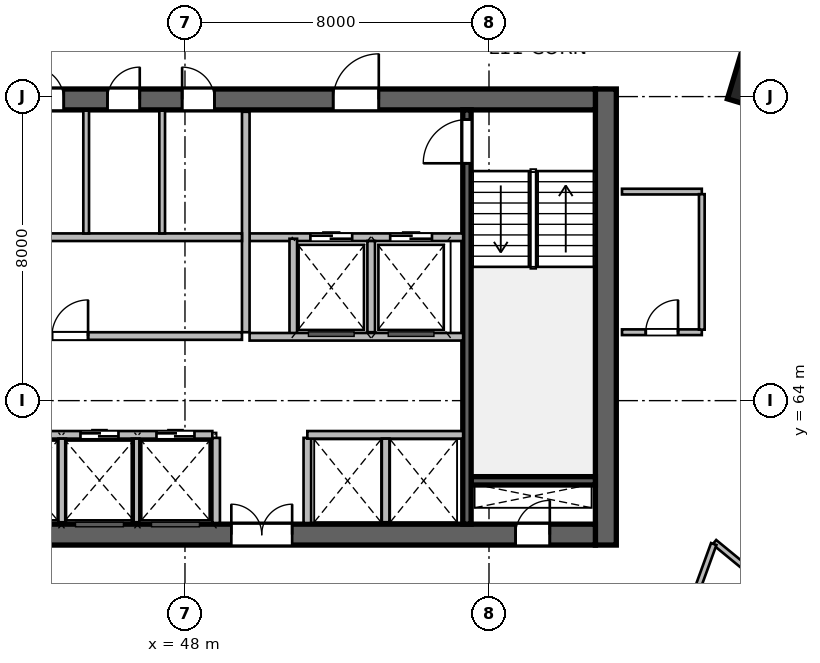
"""IFC4 building model, lengths in metres.
Left out: names, types, materials, properties, quantities, classifications, styles, units other than length and angle.
Written with IfcOpenShell. Run it as: python <this file> out.ifc"""

import sys

from ifc_helpers import new_model, si_unit, direction, frame, frame_2d, origin, origin_2d, place, context, subcontext, project, spatial, rectangle, extrude, source, transform, mapped, element, fill, save


model = new_model("IFC4")
c1 = context("Model", 3, precision=1e-05, world=origin(), true_north=direction((0.0, 1.0)))
c2 = subcontext(c1, "Body", "Model", "MODEL_VIEW")
j1 = project(units=[si_unit("LENGTHUNIT", "METRE"), si_unit("PLANEANGLEUNIT", "RADIAN")], contexts=[c1])
p1 = place(None, origin())
s1 = spatial("IfcSite", under=j1, at=p1, CompositionType="ELEMENT")
p2 = place(p1, origin())
s2 = spatial("IfcBuilding", under=s1, at=p2, CompositionType="ELEMENT")
p3 = place(p2, frame((0.0, 0.0, 53.4)))
s3 = spatial("IfcBuildingStorey", under=s2, at=p3, CompositionType="ELEMENT", Elevation=53.4)
m1 = source(origin(), c2, "Body", "SweptSolid", [
    extrude(rectangle(XDim=12.0, YDim=0.55, at=frame_2d((6.0, 0.0))), origin(), (0.0, 0.0, 1.0), 3.6),
])
p4 = place(p3, frame((59.075, 60.2, 0.0), z_axis=(0.0, 0.0, 1.0), x_axis=(0.0, 1.0, 0.0)))
e1 = element("IfcWall", 1, at=p4, inside=s3, PredefinedType="SHEAR", context=c2, shape_type="MappedRepresentation", body=[
    mapped(m1, transform((0.0, 0.0, 0.0), scale=1.0)),
])
m2 = source(origin(), c2, "Body", "SweptSolid", [
    extrude(rectangle(XDim=21.6, YDim=0.55, at=frame_2d((10.8, 0.0))), origin(), (0.0, 0.0, 1.0), 3.6),
])
p5 = place(p3, frame((37.2, 60.475, 0.0), z_axis=(0.0, 0.0, 1.0), x_axis=(1.0, 0.0, 0.0)))
e2 = element("IfcWall", 2, at=p5, inside=s3, PredefinedType="SHEAR", context=c2, shape_type="MappedRepresentation", body=[
    mapped(m2, transform((0.0, 0.0, 0.0), scale=1.0)),
])
p6 = place(p5, frame((1.1, 0.0, 0.0)))
e3 = element("IfcOpeningElement", 3, at=p6, cuts=e2, PredefinedType="OPENING", context=c2, shape_type="SweptSolid", body=[
    extrude(rectangle(XDim=1.15, YDim=2.15, at=frame_2d((0.575, 1.075))), frame((0.0, 0.285, 0.0), z_axis=(0.0, -1.0, 0.0), x_axis=(1.0, 0.0, 0.0)), (0.0, 0.0, 1.0), 0.57),
])
p7 = place(p5, frame((19.5, 0.0, 0.0)))
e4 = element("IfcOpeningElement", 4, at=p7, cuts=e2, PredefinedType="OPENING", context=c2, shape_type="SweptSolid", body=[
    extrude(rectangle(XDim=0.9, YDim=2.1, at=frame_2d((0.45, 1.05))), frame((0.0, 0.285, 0.0), z_axis=(0.0, -1.0, 0.0), x_axis=(1.0, 0.0, 0.0)), (0.0, 0.0, 1.0), 0.57),
])
p8 = place(p5, frame((12.02, 0.0, 0.0)))
e5 = element("IfcOpeningElement", 5, at=p8, cuts=e2, PredefinedType="OPENING", context=c2, shape_type="SweptSolid", body=[
    extrude(rectangle(XDim=1.6, YDim=2.15, at=frame_2d((0.8, 1.075))), frame((0.0, 0.285, 0.0), z_axis=(0.0, -1.0, 0.0), x_axis=(1.0, 0.0, 0.0)), (0.0, 0.0, 1.0), 0.57),
])
p9 = place(p3, frame((37.2, 71.925, 0.0), z_axis=(0.0, 0.0, 1.0), x_axis=(1.0, 0.0, 0.0)))
e6 = element("IfcWall", 6, at=p9, inside=s3, PredefinedType="SHEAR", context=c2, shape_type="MappedRepresentation", body=[
    mapped(m2, transform((0.0, 0.0, 0.0), scale=1.0)),
])
p10 = place(p9, frame((1.2, 0.0, 0.0)))
e7 = element("IfcOpeningElement", 7, at=p10, cuts=e6, PredefinedType="OPENING", context=c2, shape_type="SweptSolid", body=[
    extrude(rectangle(XDim=0.9, YDim=2.1, at=frame_2d((0.45, 1.05))), frame((0.0, 0.285, 0.0), z_axis=(0.0, -1.0, 0.0), x_axis=(1.0, 0.0, 0.0)), (0.0, 0.0, 1.0), 0.57),
])
p11 = place(p9, frame((14.7, 0.0, 0.0)))
e8 = element("IfcOpeningElement", 8, at=p11, cuts=e6, PredefinedType="OPENING", context=c2, shape_type="SweptSolid", body=[
    extrude(rectangle(XDim=1.2, YDim=2.15, at=frame_2d((0.6, 1.075))), frame((0.0, 0.285, 0.0), z_axis=(0.0, -1.0, 0.0), x_axis=(1.0, 0.0, 0.0)), (0.0, 0.0, 1.0), 0.57),
])
p12 = place(p9, frame((4.15, 0.0, 0.0)))
e9 = element("IfcOpeningElement", 9, at=p12, cuts=e6, PredefinedType="OPENING", context=c2, shape_type="SweptSolid", body=[
    extrude(rectangle(XDim=1.3, YDim=2.15, at=frame_2d((0.65, 1.075))), frame((0.0, 0.285, 0.0), z_axis=(0.0, -1.0, 0.0), x_axis=(1.0, 0.0, 0.0)), (0.0, 0.0, 1.0), 0.57),
])
p13 = place(p9, frame((6.76, 0.0, 0.0)))
e10 = element("IfcOpeningElement", 10, at=p13, cuts=e6, PredefinedType="OPENING", context=c2, shape_type="SweptSolid", body=[
    extrude(rectangle(XDim=0.85, YDim=2.1, at=frame_2d((0.425, 1.05))), frame((0.0, 0.285, 0.0), z_axis=(0.0, -1.0, 0.0), x_axis=(1.0, 0.0, 0.0)), (0.0, 0.0, 1.0), 0.57),
])
p14 = place(p9, frame((8.76, 0.0, 0.0)))
e11 = element("IfcOpeningElement", 11, at=p14, cuts=e6, PredefinedType="OPENING", context=c2, shape_type="SweptSolid", body=[
    extrude(rectangle(XDim=0.85, YDim=2.1, at=frame_2d((0.425, 1.05))), frame((0.0, 0.285, 0.0), z_axis=(0.0, -1.0, 0.0), x_axis=(1.0, 0.0, 0.0)), (0.0, 0.0, 1.0), 0.57),
])
p15 = place(p9, frame((10.725, 0.0, 0.0)))
e12 = element("IfcOpeningElement", 12, at=p15, cuts=e6, PredefinedType="OPENING", context=c2, shape_type="SweptSolid", body=[
    extrude(rectangle(XDim=0.85, YDim=2.1, at=frame_2d((0.425, 1.05))), frame((0.0, 0.285, 0.0), z_axis=(0.0, -1.0, 0.0), x_axis=(1.0, 0.0, 0.0)), (0.0, 0.0, 1.0), 0.57),
])
m3 = source(origin(), c2, "Body", "SweptSolid", [
    extrude(rectangle(XDim=3.27, YDim=0.22, at=frame_2d((1.635, 0.0))), origin(), (0.0, 0.0, 1.0), 3.6),
])
p16 = place(p3, frame((55.53, 61.89, 0.0), z_axis=(0.0, 0.0, 1.0), x_axis=(1.0, 0.0, 0.0)))
e13 = element("IfcWall", 13, at=p16, inside=s3, PredefinedType="SHEAR", context=c2, shape_type="MappedRepresentation", body=[
    mapped(m3, transform((0.0, 0.0, 0.0), scale=1.0)),
])
m4 = source(origin(), c2, "Body", "SweptSolid", [
    extrude(rectangle(XDim=10.9, YDim=0.22, at=frame_2d((5.45, 0.0))), origin(), (0.0, 0.0, 1.0), 3.6),
])
p17 = place(p3, frame((55.42, 60.75, 0.0), z_axis=(0.0, 0.0, 1.0), x_axis=(0.0, 1.0, 0.0)))
e14 = element("IfcWall", 14, at=p17, inside=s3, PredefinedType="SHEAR", context=c2, shape_type="MappedRepresentation", body=[
    mapped(m4, transform((0.0, 0.0, 0.0), scale=1.0)),
])
p18 = place(p17, frame((9.495, 0.0, 0.0)))
e15 = element("IfcOpeningElement", 15, at=p18, cuts=e14, PredefinedType="OPENING", context=c2, shape_type="SweptSolid", body=[
    extrude(rectangle(XDim=1.15, YDim=2.15, at=frame_2d((0.575, 1.075))), frame((0.0, 0.12, 0.0), z_axis=(0.0, -1.0, 0.0), x_axis=(1.0, 0.0, 0.0)), (0.0, 0.0, 1.0), 0.24),
])
m5 = source(origin(), c2, "Body", "SweptSolid", [
    extrude(rectangle(XDim=1.5, YDim=1.5, at=origin_2d()), origin(), (0.0, 0.0, 1.0), 3.6),
])
p19 = place(p3, frame((63.209, 72.442, 0.0), z_axis=(0.0, 0.0, 1.0), x_axis=(0.288697611798, 0.957420330337, 0.0)))
e16 = element("IfcColumn", 16, at=p19, inside=s3, PredefinedType="COLUMN", context=c2, shape_type="MappedRepresentation", body=[
    mapped(m5, transform((0.0, 0.0, 0.0), scale=1.0)),
])
m6 = source(origin(), c2, "Body", "SweptSolid", [
    extrude(rectangle(XDim=2.24, YDim=0.2, at=frame_2d((1.12, 0.0))), origin(), (0.0, 0.0, 1.0), 3.36),
])
for number, where, z_axis, x_axis in (
    (17, (48.82, 60.78, 0.0), (0.0, 0.0, 1.0), (0.0, 1.0, 0.0)),
    (18, (51.22, 60.78, 0.0), (0.0, 0.0, 1.0), (0.0, 1.0, 0.0)),
):
    element("IfcWall", number, at=place(p3, frame(where, z_axis=z_axis, x_axis=x_axis)), inside=s3, PredefinedType="SOLIDWALL", context=c2, shape_type="MappedRepresentation", body=[
        mapped(m6, transform((0.0, 0.0, 0.0), scale=1.0)),
    ])
m7 = source(origin(), c2, "Body", "SweptSolid", [
    extrude(rectangle(XDim=5.62, YDim=0.2, at=frame_2d((2.81, 0.0))), origin(), (0.0, 0.0, 1.0), 3.36),
])
p20 = place(p3, frame((49.7, 68.3, 0.0), z_axis=(0.0, 0.0, 1.0), x_axis=(1.0, 0.0, 0.0)))
e19 = element("IfcWall", 19, at=p20, inside=s3, PredefinedType="SOLIDWALL", context=c2, shape_type="MappedRepresentation", body=[
    mapped(m7, transform((0.0, 0.0, 0.0), scale=1.0)),
])
p21 = place(p20, frame((1.6, 0.0, 0.0)))
e20 = element("IfcOpeningElement", 20, at=p21, cuts=e19, PredefinedType="OPENING", context=c2, shape_type="SweptSolid", body=[
    extrude(rectangle(XDim=1.1, YDim=2.15, at=frame_2d((0.55, 1.075))), frame((0.0, 0.11, 0.0), z_axis=(0.0, -1.0, 0.0), x_axis=(1.0, 0.0, 0.0)), (0.0, 0.0, 1.0), 0.22),
])
p22 = place(p20, frame((3.7, 0.0, 0.0)))
e21 = element("IfcOpeningElement", 21, at=p22, cuts=e19, PredefinedType="OPENING", context=c2, shape_type="SweptSolid", body=[
    extrude(rectangle(XDim=1.1, YDim=2.15, at=frame_2d((0.55, 1.075))), frame((0.0, 0.11, 0.0), z_axis=(0.0, -1.0, 0.0), x_axis=(1.0, 0.0, 0.0)), (0.0, 0.0, 1.0), 0.22),
])
m8 = source(origin(), c2, "Body", "SweptSolid", [
    extrude(rectangle(XDim=5.8, YDim=0.2, at=frame_2d((2.9, 0.0))), origin(), (0.0, 0.0, 1.0), 3.36),
])
p23 = place(p3, frame((49.6, 65.8, 0.0), z_axis=(0.0, 0.0, 1.0), x_axis=(0.0, 1.0, 0.0)))
e22 = element("IfcWall", 22, at=p23, inside=s3, PredefinedType="SOLIDWALL", context=c2, shape_type="MappedRepresentation", body=[
    mapped(m8, transform((0.0, 0.0, 0.0), scale=1.0)),
])
m9 = source(origin(), c2, "Body", "SweptSolid", [
    extrude(rectangle(XDim=2.58, YDim=0.2, at=frame_2d((1.29, 0.0))), origin(), (0.0, 0.0, 1.0), 3.36),
])
p24 = place(p3, frame((50.85, 65.68, 0.0), z_axis=(0.0, 0.0, 1.0), x_axis=(0.0, 1.0, 0.0)))
e23 = element("IfcWall", 23, at=p24, inside=s3, PredefinedType="SOLIDWALL", context=c2, shape_type="MappedRepresentation", body=[
    mapped(m9, transform((0.0, 0.0, 0.0), scale=1.0)),
])
m10 = source(origin(), c2, "Body", "SweptSolid", [
    extrude(rectangle(XDim=2.4, YDim=0.2, at=frame_2d((1.2, 0.0))), origin(), (0.0, 0.0, 1.0), 3.36),
])
p25 = place(p3, frame((52.9, 65.8, 0.0), z_axis=(0.0, 0.0, 1.0), x_axis=(0.0, 1.0, 0.0)))
e24 = element("IfcWall", 24, at=p25, inside=s3, PredefinedType="SOLIDWALL", context=c2, shape_type="MappedRepresentation", body=[
    mapped(m10, transform((0.0, 0.0, 0.0), scale=1.0)),
])
p26 = place(p3, frame((49.7, 65.68, 0.0), z_axis=(0.0, 0.0, 1.0), x_axis=(1.0, 0.0, 0.0)))
e25 = element("IfcWall", 25, at=p26, inside=s3, PredefinedType="SOLIDWALL", context=c2, shape_type="MappedRepresentation", body=[
    mapped(m7, transform((0.0, 0.0, 0.0), scale=1.0)),
])
m11 = source(origin(), c2, "Body", "SweptSolid", [
    extrude(rectangle(XDim=8.8, YDim=0.2, at=frame_2d((4.4, 0.0))), origin(), (0.0, 0.0, 1.0), 3.36),
])
p27 = place(p3, frame((40.7, 68.3, 0.0), z_axis=(0.0, 0.0, 1.0), x_axis=(1.0, 0.0, 0.0)))
e26 = element("IfcWall", 26, at=p27, inside=s3, PredefinedType="SOLIDWALL", context=c2, shape_type="MappedRepresentation", body=[
    mapped(m11, transform((0.0, 0.0, 0.0), scale=1.0)),
])
m12 = source(origin(), c2, "Body", "SweptSolid", [
    extrude(rectangle(XDim=3.23, YDim=0.15, at=frame_2d((1.615, 0.0))), origin(), (0.0, 0.0, 1.0), 3.36),
])
for number, where, z_axis, x_axis in (
    (27, (45.4, 68.4, 0.0), (0.0, 0.0, 1.0), (0.0, 1.0, 0.0)),
    (28, (47.4, 68.4, 0.0), (0.0, 0.0, 1.0), (0.0, 1.0, 0.0)),
):
    element("IfcWall", number, at=place(p3, frame(where, z_axis=z_axis, x_axis=x_axis)), inside=s3, PredefinedType="PARTITIONING", context=c2, shape_type="MappedRepresentation", body=[
        mapped(m12, transform((0.0, 0.0, 0.0), scale=1.0)),
    ])
m13 = source(origin(), c2, "Body", "SweptSolid", [
    extrude(rectangle(XDim=8.02, YDim=0.2, at=frame_2d((4.01, 0.0))), origin(), (0.0, 0.0, 1.0), 3.36),
])
p28 = place(p3, frame((40.7, 63.1, 0.0), z_axis=(0.0, 0.0, 1.0), x_axis=(1.0, 0.0, 0.0)))
e29 = element("IfcWall", 29, at=p28, inside=s3, PredefinedType="SOLIDWALL", context=c2, shape_type="MappedRepresentation", body=[
    mapped(m13, transform((0.0, 0.0, 0.0), scale=1.0)),
])
p29 = place(p28, frame((0.72, 0.0, 0.0)))
e30 = element("IfcOpeningElement", 30, at=p29, cuts=e29, PredefinedType="OPENING", context=c2, shape_type="SweptSolid", body=[
    extrude(rectangle(XDim=1.0, YDim=2.15, at=frame_2d((0.5, 1.075))), frame((0.0, 0.11, 0.0), z_axis=(0.0, -1.0, 0.0), x_axis=(1.0, 0.0, 0.0)), (0.0, 0.0, 1.0), 0.22),
])
p30 = place(p28, frame((2.62, 0.0, 0.0)))
e31 = element("IfcOpeningElement", 31, at=p30, cuts=e29, PredefinedType="OPENING", context=c2, shape_type="SweptSolid", body=[
    extrude(rectangle(XDim=1.0, YDim=2.15, at=frame_2d((0.5, 1.075))), frame((0.0, 0.11, 0.0), z_axis=(0.0, -1.0, 0.0), x_axis=(1.0, 0.0, 0.0)), (0.0, 0.0, 1.0), 0.22),
])
p31 = place(p28, frame((4.55, 0.0, 0.0)))
e32 = element("IfcOpeningElement", 32, at=p31, cuts=e29, PredefinedType="OPENING", context=c2, shape_type="SweptSolid", body=[
    extrude(rectangle(XDim=1.0, YDim=2.15, at=frame_2d((0.5, 1.075))), frame((0.0, 0.11, 0.0), z_axis=(0.0, -1.0, 0.0), x_axis=(1.0, 0.0, 0.0)), (0.0, 0.0, 1.0), 0.22),
])
p32 = place(p28, frame((6.55, 0.0, 0.0)))
e33 = element("IfcOpeningElement", 33, at=p32, cuts=e29, PredefinedType="OPENING", context=c2, shape_type="SweptSolid", body=[
    extrude(rectangle(XDim=1.0, YDim=2.15, at=frame_2d((0.5, 1.075))), frame((0.0, 0.11, 0.0), z_axis=(0.0, -1.0, 0.0), x_axis=(1.0, 0.0, 0.0)), (0.0, 0.0, 1.0), 0.22),
])
m14 = source(origin(), c2, "Body", "SweptSolid", [
    extrude(rectangle(XDim=4.1, YDim=0.2, at=frame_2d((2.05, 0.0))), origin(), (0.0, 0.0, 1.0), 3.36),
])
p33 = place(p3, frame((51.22, 63.1, 0.0), z_axis=(0.0, 0.0, 1.0), x_axis=(1.0, 0.0, 0.0)))
e34 = element("IfcWall", 34, at=p33, inside=s3, PredefinedType="SOLIDWALL", context=c2, shape_type="MappedRepresentation", body=[
    mapped(m14, transform((0.0, 0.0, 0.0), scale=1.0)),
])
m15 = source(origin(), c2, "Body", "SweptSolid", [
    extrude(rectangle(XDim=2.2, YDim=0.2, at=frame_2d((1.1, 0.0))), origin(), (0.0, 0.0, 1.0), 3.36),
])
for number, where, z_axis, x_axis in (
    (35, (44.77, 60.8, 0.0), (0.0, 0.0, 1.0), (0.0, 1.0, 0.0)),
    (36, (46.7, 60.8, 0.0), (0.0, 0.0, 1.0), (0.0, 1.0, 0.0)),
    (37, (53.28, 60.8, 0.0), (0.0, 0.0, 1.0), (0.0, 1.0, 0.0)),
):
    element("IfcWall", number, at=place(p3, frame(where, z_axis=z_axis, x_axis=x_axis)), inside=s3, PredefinedType="SOLIDWALL", context=c2, shape_type="MappedRepresentation", body=[
        mapped(m15, transform((0.0, 0.0, 0.0), scale=1.0)),
    ])
p34 = place(p3, frame((40.7, 65.7, 0.0), z_axis=(0.0, 0.0, 1.0), x_axis=(1.0, 0.0, 0.0)))
e38 = element("IfcWall", 38, at=p34, inside=s3, PredefinedType="SOLIDWALL", context=c2, shape_type="MappedRepresentation", body=[
    mapped(m11, transform((0.0, 0.0, 0.0), scale=1.0)),
])
p35 = place(p34, frame((3.8, 0.0, 0.0)))
e39 = element("IfcOpeningElement", 39, at=p35, cuts=e38, PredefinedType="OPENING", context=c2, shape_type="SweptSolid", body=[
    extrude(rectangle(XDim=0.95, YDim=2.15, at=frame_2d((0.475, 1.075))), frame((0.0, 0.11, 0.0), z_axis=(0.0, -1.0, 0.0), x_axis=(1.0, 0.0, 0.0)), (0.0, 0.0, 1.0), 0.22),
])
m16 = source(origin(), c2, "Body", "SweptSolid", [
    extrude(rectangle(XDim=2.1, YDim=0.15, at=frame_2d((1.05, 0.0))), origin(), (0.0, 0.0, 1.0), 3.36),
])
p36 = place(p3, frame((59.5, 65.8, 0.0), z_axis=(0.0, 0.0, 1.0), x_axis=(1.0, 0.0, 0.0)))
e40 = element("IfcWall", 40, at=p36, inside=s3, PredefinedType="PARTITIONING", context=c2, shape_type="MappedRepresentation", body=[
    mapped(m16, transform((0.0, 0.0, 0.0), scale=1.0)),
])
p37 = place(p36, frame((0.625, 0.0, 0.0)))
e41 = element("IfcOpeningElement", 41, at=p37, cuts=e40, PredefinedType="OPENING", context=c2, shape_type="SweptSolid", body=[
    extrude(rectangle(XDim=0.85, YDim=2.1, at=frame_2d((0.425, 1.05))), frame((0.0, 0.085, 0.0), z_axis=(0.0, -1.0, 0.0), x_axis=(1.0, 0.0, 0.0)), (0.0, 0.0, 1.0), 0.17),
])
p38 = place(p3, frame((59.5, 69.5, 0.0), z_axis=(0.0, 0.0, 1.0), x_axis=(1.0, 0.0, 0.0)))
e42 = element("IfcWall", 42, at=p38, inside=s3, PredefinedType="PARTITIONING", context=c2, shape_type="MappedRepresentation", body=[
    mapped(m16, transform((0.0, 0.0, 0.0), scale=1.0)),
])
m17 = source(origin(), c2, "Body", "SweptSolid", [
    extrude(rectangle(XDim=3.565, YDim=0.15, at=frame_2d((1.783, 0.0))), origin(), (0.0, 0.0, 1.0), 3.36),
])
p39 = place(p3, frame((61.6, 65.867, 0.0), z_axis=(0.0, 0.0, 1.0), x_axis=(0.0, 1.0, 0.0)))
e43 = element("IfcWall", 43, at=p39, inside=s3, PredefinedType="PARTITIONING", context=c2, shape_type="MappedRepresentation", body=[
    mapped(m17, transform((0.0, 0.0, 0.0), scale=1.0)),
])
m18 = source(origin(), c2, "Body", "SweptSolid", [
    extrude(rectangle(XDim=6.721, YDim=0.15, at=frame_2d((3.361, 0.0))), origin(), (0.0, 0.0, 1.0), 3.36),
])
p40 = place(p3, frame((61.931, 60.275, 0.0), z_axis=(0.0, 0.0, 1.0), x_axis=(0.772828051199, -0.63461547671, 0.0)))
e44 = element("IfcWall", 44, at=p40, inside=s3, PredefinedType="PARTITIONING", context=c2, shape_type="MappedRepresentation", body=[
    mapped(m18, transform((0.0, 0.0, 0.0), scale=1.0)),
])
p41 = place(p40, frame((2.66, 0.0, 0.0)))
e45 = element("IfcOpeningElement", 45, at=p41, cuts=e44, PredefinedType="OPENING", context=c2, shape_type="SweptSolid", body=[
    extrude(rectangle(XDim=1.4, YDim=2.15, at=frame_2d((0.7, 1.075))), frame((0.0, 0.085, 0.0), z_axis=(0.0, -1.0, 0.0), x_axis=(1.0, 0.0, 0.0)), (0.0, 0.0, 1.0), 0.17),
])
m19 = source(origin(), c2, "Body", "SweptSolid", [
    extrude(rectangle(XDim=12.196, YDim=0.15, at=frame_2d((6.098, 0.0))), origin(), (0.0, 0.0, 1.0), 3.36),
])
p42 = place(p3, frame((57.742, 48.766, 0.0), z_axis=(0.0, 0.0, 1.0), x_axis=(0.342022711534, 0.939691686031, 0.0)))
e46 = element("IfcWall", 46, at=p42, inside=s3, PredefinedType="PARTITIONING", context=c2, shape_type="MappedRepresentation", body=[
    mapped(m19, transform((0.0, 0.0, 0.0), scale=1.0)),
])
m20 = source(origin(), c2, "Body", "SweptSolid", [
    extrude(rectangle(XDim=0.9, YDim=2.1, at=frame_2d((0.45, 1.05))), frame((0.0, 0.025, 0.0), z_axis=(0.0, -1.0, 0.0), x_axis=(1.0, 0.0, 0.0)), (0.0, 0.0, 1.0), 0.05),
])
p43 = place(p7, origin())
e47 = element("IfcDoor", 47, at=p43, inside=s3, OperationType="SINGLE_SWING_RIGHT", PredefinedType="DOOR", context=c2, shape_type="MappedRepresentation", body=[
    mapped(m20, transform((0.0, 0.0, 0.0), scale=1.0)),
])
fill(e4, e47)
m21 = source(origin(), c2, "Body", "SweptSolid", [
    extrude(rectangle(XDim=1.15, YDim=2.15, at=frame_2d((0.575, 1.075))), frame((0.0, 0.025, 0.0), z_axis=(0.0, -1.0, 0.0), x_axis=(1.0, 0.0, 0.0)), (0.0, 0.0, 1.0), 0.05),
])
p44 = place(p18, origin())
e48 = element("IfcDoor", 48, at=p44, inside=s3, OperationType="SINGLE_SWING_LEFT", PredefinedType="DOOR", context=c2, shape_type="MappedRepresentation", body=[
    mapped(m21, transform((0.0, 0.0, 0.0), scale=1.0)),
])
fill(e15, e48)
m22 = source(origin(), c2, "Body", "SweptSolid", [
    extrude(rectangle(XDim=1.6, YDim=2.15, at=frame_2d((0.8, 1.075))), frame((0.0, 0.025, 0.0), z_axis=(0.0, -1.0, 0.0), x_axis=(1.0, 0.0, 0.0)), (0.0, 0.0, 1.0), 0.05),
])
p45 = place(p8, origin())
e49 = element("IfcDoor", 49, at=p45, inside=s3, OperationType="DOUBLE_DOOR_SINGLE_SWING", PredefinedType="DOOR", context=c2, shape_type="MappedRepresentation", body=[
    mapped(m22, transform((0.0, 0.0, 0.0), scale=1.0)),
])
fill(e5, e49)
m23 = source(origin(), c2, "Body", "SweptSolid", [
    extrude(rectangle(XDim=1.2, YDim=2.15, at=frame_2d((0.6, 1.075))), frame((0.0, 0.025, 0.0), z_axis=(0.0, -1.0, 0.0), x_axis=(1.0, 0.0, 0.0)), (0.0, 0.0, 1.0), 0.05),
])
p46 = place(p11, origin())
e50 = element("IfcDoor", 50, at=p46, inside=s3, OperationType="SINGLE_SWING_RIGHT", PredefinedType="DOOR", context=c2, shape_type="MappedRepresentation", body=[
    mapped(m23, transform((0.0, 0.0, 0.0), scale=1.0)),
])
fill(e8, e50)
m24 = source(origin(), c2, "Body", "SweptSolid", [
    extrude(rectangle(XDim=1.1, YDim=2.15, at=frame_2d((0.55, 1.075))), frame((0.0, 0.025, 0.0), z_axis=(0.0, -1.0, 0.0), x_axis=(1.0, 0.0, 0.0)), (0.0, 0.0, 1.0), 0.05),
])
p47 = place(p21, origin())
e51 = element("IfcDoor", 51, at=p47, inside=s3, OperationType="DOUBLE_DOOR_SLIDING", PredefinedType="DOOR", context=c2, shape_type="MappedRepresentation", body=[
    mapped(m24, transform((0.0, 0.0, 0.0), scale=1.0)),
])
fill(e20, e51)
p48 = place(p22, origin())
e52 = element("IfcDoor", 52, at=p48, inside=s3, OperationType="DOUBLE_DOOR_SLIDING", PredefinedType="DOOR", context=c2, shape_type="MappedRepresentation", body=[
    mapped(m24, transform((0.0, 0.0, 0.0), scale=1.0)),
])
fill(e21, e52)
m25 = source(origin(), c2, "Body", "SweptSolid", [
    extrude(rectangle(XDim=0.85, YDim=2.1, at=frame_2d((0.425, 1.05))), frame((0.0, 0.025, 0.0), z_axis=(0.0, -1.0, 0.0), x_axis=(1.0, 0.0, 0.0)), (0.0, 0.0, 1.0), 0.05),
])
p49 = place(p13, origin())
e53 = element("IfcDoor", 53, at=p49, inside=s3, OperationType="SINGLE_SWING_LEFT", PredefinedType="DOOR", context=c2, shape_type="MappedRepresentation", body=[
    mapped(m25, transform((0.0, 0.0, 0.0), scale=1.0)),
])
fill(e10, e53)
p50 = place(p14, origin())
e54 = element("IfcDoor", 54, at=p50, inside=s3, OperationType="SINGLE_SWING_RIGHT", PredefinedType="DOOR", context=c2, shape_type="MappedRepresentation", body=[
    mapped(m25, transform((0.0, 0.0, 0.0), scale=1.0)),
])
fill(e11, e54)
p51 = place(p15, origin())
e55 = element("IfcDoor", 55, at=p51, inside=s3, OperationType="SINGLE_SWING_LEFT", PredefinedType="DOOR", context=c2, shape_type="MappedRepresentation", body=[
    mapped(m25, transform((0.0, 0.0, 0.0), scale=1.0)),
])
fill(e12, e55)
m26 = source(origin(), c2, "Body", "SweptSolid", [
    extrude(rectangle(XDim=1.0, YDim=2.15, at=frame_2d((0.5, 1.075))), frame((0.0, 0.025, 0.0), z_axis=(0.0, -1.0, 0.0), x_axis=(1.0, 0.0, 0.0)), (0.0, 0.0, 1.0), 0.05),
])
p52 = place(p31, origin())
e56 = element("IfcDoor", 56, at=p52, inside=s3, OperationType="DOUBLE_DOOR_SLIDING", PredefinedType="DOOR", context=c2, shape_type="MappedRepresentation", body=[
    mapped(m26, transform((0.0, 0.0, 0.0), scale=1.0)),
])
fill(e32, e56)
p53 = place(p32, origin())
e57 = element("IfcDoor", 57, at=p53, inside=s3, OperationType="DOUBLE_DOOR_SLIDING", PredefinedType="DOOR", context=c2, shape_type="MappedRepresentation", body=[
    mapped(m26, transform((0.0, 0.0, 0.0), scale=1.0)),
])
fill(e33, e57)
m27 = source(origin(), c2, "Body", "SweptSolid", [
    extrude(rectangle(XDim=0.95, YDim=2.15, at=frame_2d((0.475, 1.075))), frame((0.0, 0.025, 0.0), z_axis=(0.0, -1.0, 0.0), x_axis=(1.0, 0.0, 0.0)), (0.0, 0.0, 1.0), 0.05),
])
p54 = place(p35, origin())
e58 = element("IfcDoor", 58, at=p54, inside=s3, OperationType="SINGLE_SWING_RIGHT", PredefinedType="DOOR", context=c2, shape_type="MappedRepresentation", body=[
    mapped(m27, transform((0.0, 0.0, 0.0), scale=1.0)),
])
fill(e39, e58)
p55 = place(p37, origin())
e59 = element("IfcDoor", 59, at=p55, inside=s3, OperationType="SINGLE_SWING_RIGHT", PredefinedType="DOOR", context=c2, shape_type="MappedRepresentation", body=[
    mapped(m25, transform((0.0, 0.0, 0.0), scale=1.0)),
])
fill(e41, e59)
save(model, sys.argv[1])
